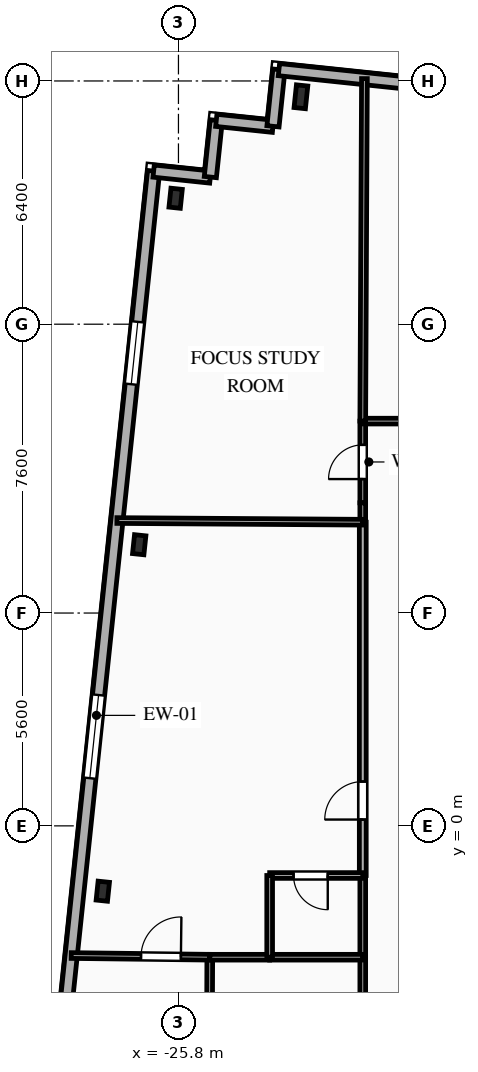
"""IFC4 building model, lengths in metres.
Left out: names, types, materials, properties, quantities, classifications, styles, units other than length and angle.
Written with IfcOpenShell. Run it as: python <this file> out.ifc"""

import sys

from ifc_helpers import new_model, si_unit, direction, frame, frame_2d, origin, origin_2d, place, context, subcontext, project, spatial, rectangle, i_section, extrude, element, fill, save


model = new_model("IFC4")
c1 = context("Model", 3, precision=1e-05, world=origin(), true_north=direction((0.0, 1.0)))
c2 = subcontext(c1, "Body", "Model", "MODEL_VIEW")
j1 = project(units=[si_unit("LENGTHUNIT", "METRE"), si_unit("PLANEANGLEUNIT", "RADIAN")], contexts=[c1])
p1 = place(None, origin())
s1 = spatial("IfcSite", under=j1, at=p1, CompositionType="ELEMENT")
p2 = place(p1, origin())
s2 = spatial("IfcBuilding", under=s1, at=p2, CompositionType="ELEMENT")
p3 = place(p2, frame((0.0, 0.0, 209.8)))
s3 = spatial("IfcBuildingStorey", under=s2, at=p3, CompositionType="ELEMENT", Elevation=209.8)
p4 = place(p3, frame((-22.577, 19.184, 0.0), z_axis=(0.0, 0.0, 1.0), x_axis=(0.994521895368, -0.104528463268, 0.0)))
e1 = element("IfcColumn", 1, at=p4, inside=s3, PredefinedType="COLUMN", context=c2, shape_type="SweptSolid", body=[
    extrude(i_section(OverallWidth=0.3, OverallDepth=0.6, WebThickness=0.015, FlangeThickness=0.03, FilletRadius=0.027, at=origin_2d()), origin(), (0.0, 0.0, 1.0), 3.35),
])
for number, where, z_axis, x_axis in (
    (2, (-25.875, 16.514, 0.0), (0.0, 0.0, 1.0), (0.995, -0.105, 0.0)),
    (3, (-26.833, 7.398, 0.0), (0.0, 0.0, 1.0), (0.995, -0.105, 0.0)),
    (4, (-27.791, -1.719, 0.0), (0.0, 0.0, 1.0), (0.995, -0.105, 0.0)),
):
    element("IfcColumn", number, at=place(p3, frame(where, z_axis=z_axis, x_axis=x_axis)), inside=s3, PredefinedType="COLUMN", context=c2, shape_type="SweptSolid", body=[
        extrude(i_section(OverallWidth=0.3, OverallDepth=0.5, WebThickness=0.014, FlangeThickness=0.028, FilletRadius=0.027, at=origin_2d()), origin(), (0.0, 0.0, 1.0), 3.35),
    ])
p5 = place(p3, frame((-29.463, -11.414, 0.0), z_axis=(0.0, 0.0, 1.0), x_axis=(0.104530779244, 0.994521651947, 0.0)))
e5 = element("IfcWall", 5, at=p5, inside=s3, PredefinedType="SOLIDWALL", context=c2, shape_type="SweptSolid", body=[
    extrude(rectangle(XDim=28.8, YDim=0.32, at=frame_2d((14.4, 0.0))), origin(), (0.0, 0.0, 1.0), 3.04),
])
p6 = place(p5, frame((3.467, 0.0, 0.85)))
e6 = element("IfcOpeningElement", 6, at=p6, cuts=e5, PredefinedType="OPENING", context=c2, shape_type="SweptSolid", body=[
    extrude(rectangle(XDim=1.65, YDim=1.85, at=frame_2d((0.825, 0.925))), frame((0.0, 0.17, 0.0), z_axis=(0.0, -1.0, 0.0), x_axis=(1.0, 0.0, 0.0)), (0.0, 0.0, 1.0), 0.34),
])
p7 = place(p5, frame((12.738, 0.0, 0.85)))
e7 = element("IfcOpeningElement", 7, at=p7, cuts=e5, PredefinedType="OPENING", context=c2, shape_type="SweptSolid", body=[
    extrude(rectangle(XDim=2.2, YDim=1.85, at=frame_2d((1.1, 0.925))), frame((0.0, 0.17, 0.0), z_axis=(0.0, -1.0, 0.0), x_axis=(1.0, 0.0, 0.0)), (0.0, 0.0, 1.0), 0.34),
])
p8 = place(p5, frame((23.162, 0.0, 0.85)))
e8 = element("IfcOpeningElement", 8, at=p8, cuts=e5, PredefinedType="OPENING", context=c2, shape_type="SweptSolid", body=[
    extrude(rectangle(XDim=1.65, YDim=1.85, at=frame_2d((0.825, 0.925))), frame((0.0, 0.17, 0.0), z_axis=(0.0, -1.0, 0.0), x_axis=(1.0, 0.0, 0.0)), (0.0, 0.0, 1.0), 0.34),
])
p9 = place(p3, frame((-26.453, 17.229, 0.0), z_axis=(0.0, 0.0, 1.0), x_axis=(0.994508128223, -0.104659366031, 0.0)))
e9 = element("IfcWall", 9, at=p9, inside=s3, PredefinedType="SOLIDWALL", context=c2, shape_type="SweptSolid", body=[
    extrude(rectangle(XDim=1.5, YDim=0.32, at=frame_2d((0.75, 0.0))), origin(), (0.0, 0.0, 1.0), 3.04),
])
p10 = place(p3, frame((-24.961, 17.072, 0.0), z_axis=(0.0, 0.0, 1.0), x_axis=(0.104642427191, 0.994509910675, 0.0)))
e10 = element("IfcWall", 10, at=p10, inside=s3, PredefinedType="SOLIDWALL", context=c2, shape_type="SweptSolid", body=[
    extrude(rectangle(XDim=1.5, YDim=0.32, at=frame_2d((0.75, 0.0))), origin(), (0.0, 0.0, 1.0), 3.04),
])
p11 = place(p3, frame((-24.804, 18.563, 0.0), z_axis=(0.0, 0.0, 1.0), x_axis=(0.994508128223, -0.104659366031, 0.0)))
e11 = element("IfcWall", 11, at=p11, inside=s3, PredefinedType="SOLIDWALL", context=c2, shape_type="SweptSolid", body=[
    extrude(rectangle(XDim=1.5, YDim=0.32, at=frame_2d((0.75, 0.0))), origin(), (0.0, 0.0, 1.0), 3.04),
])
p12 = place(p3, frame((-23.312, 18.406, 0.0), z_axis=(0.0, 0.0, 1.0), x_axis=(0.104481464157, 0.994526834051, 0.0)))
e12 = element("IfcWall", 12, at=p12, inside=s3, PredefinedType="SOLIDWALL", context=c2, shape_type="SweptSolid", body=[
    extrude(rectangle(XDim=1.5, YDim=0.32, at=frame_2d((0.75, 0.0))), origin(), (0.0, 0.0, 1.0), 3.04),
])
p13 = place(p3, frame((-23.156, 19.898, 0.0), z_axis=(0.0, 0.0, 1.0), x_axis=(0.994522001802, -0.104527450613, 0.0)))
e13 = element("IfcWall", 13, at=p13, inside=s3, PredefinedType="SOLIDWALL", context=c2, shape_type="SweptSolid", body=[
    extrude(rectangle(XDim=45.8, YDim=0.32, at=frame_2d((22.9, 0.0))), origin(), (0.0, 0.0, 1.0), 3.04),
])
p14 = place(p13, frame((6.021, 0.0, 0.85)))
e14 = element("IfcOpeningElement", 14, at=p14, cuts=e13, PredefinedType="OPENING", context=c2, shape_type="SweptSolid", body=[
    extrude(rectangle(XDim=1.65, YDim=1.85, at=frame_2d((0.825, 0.925))), frame((0.0, 0.17, 0.0), z_axis=(0.0, -1.0, 0.0), x_axis=(1.0, 0.0, 0.0)), (0.0, 0.0, 1.0), 0.34),
])
p15 = place(p13, frame((15.935, 0.0, 0.85)))
e15 = element("IfcOpeningElement", 15, at=p15, cuts=e13, PredefinedType="OPENING", context=c2, shape_type="SweptSolid", body=[
    extrude(rectangle(XDim=1.6, YDim=1.85, at=frame_2d((0.8, 0.925))), frame((0.0, 0.17, 0.0), z_axis=(0.0, -1.0, 0.0), x_axis=(1.0, 0.0, 0.0)), (0.0, 0.0, 1.0), 0.34),
])
p16 = place(p13, frame((22.881, 0.0, 0.85)))
e16 = element("IfcOpeningElement", 16, at=p16, cuts=e13, PredefinedType="OPENING", context=c2, shape_type="SweptSolid", body=[
    extrude(rectangle(XDim=2.2, YDim=1.85, at=frame_2d((1.1, 0.925))), frame((0.0, 0.17, 0.0), z_axis=(0.0, -1.0, 0.0), x_axis=(1.0, 0.0, 0.0)), (0.0, 0.0, 1.0), 0.34),
])
p17 = place(p13, frame((31.288, 0.0, 0.85)))
e17 = element("IfcOpeningElement", 17, at=p17, cuts=e13, PredefinedType="OPENING", context=c2, shape_type="SweptSolid", body=[
    extrude(rectangle(XDim=2.2, YDim=1.85, at=frame_2d((1.1, 0.925))), frame((0.0, 0.17, 0.0), z_axis=(0.0, -1.0, 0.0), x_axis=(1.0, 0.0, 0.0)), (0.0, 0.0, 1.0), 0.34),
])
p18 = place(p13, frame((39.69, 0.0, 0.85)))
e18 = element("IfcOpeningElement", 18, at=p18, cuts=e13, PredefinedType="OPENING", context=c2, shape_type="SweptSolid", body=[
    extrude(rectangle(XDim=1.65, YDim=1.85, at=frame_2d((0.825, 0.925))), frame((0.0, 0.17, 0.0), z_axis=(0.0, -1.0, 0.0), x_axis=(1.0, 0.0, 0.0)), (0.0, 0.0, 1.0), 0.34),
])
p19 = place(p3, frame((-20.95, 8.5, 0.0), z_axis=(0.0, 0.0, 1.0), x_axis=(0.0, 1.0, 0.0)))
e19 = element("IfcWall", 19, at=p19, inside=s3, PredefinedType="PARTITIONING", context=c2, shape_type="SweptSolid", body=[
    extrude(rectangle(XDim=2.15, YDim=0.15, at=frame_2d((1.075, 0.0))), origin(), (0.0, 0.0, 1.0), 3.04),
])
p20 = place(p19, frame((0.625, 0.0, 0.0)))
e20 = element("IfcOpeningElement", 20, at=p20, cuts=e19, PredefinedType="OPENING", context=c2, shape_type="SweptSolid", body=[
    extrude(rectangle(XDim=0.9, YDim=2.1, at=frame_2d((0.45, 1.05))), frame((0.0, 0.085, 0.0), z_axis=(0.0, -1.0, 0.0), x_axis=(1.0, 0.0, 0.0)), (0.0, 0.0, 1.0), 0.17),
])
p21 = place(p3, frame((-20.95, 10.65, 0.0), z_axis=(0.0, 0.0, 1.0), x_axis=(1.0, 0.0, 0.0)))
e21 = element("IfcWall", 21, at=p21, inside=s3, PredefinedType="PARTITIONING", context=c2, shape_type="SweptSolid", body=[
    extrude(rectangle(XDim=8.98, YDim=0.15, at=frame_2d((4.49, 0.0))), origin(), (0.0, 0.0, 1.0), 3.04),
])
p22 = place(p21, frame((6.504, 0.0, 0.0)))
e22 = element("IfcOpeningElement", 22, at=p22, cuts=e21, PredefinedType="OPENING", context=c2, shape_type="SweptSolid", body=[
    extrude(rectangle(XDim=1.05, YDim=2.15, at=frame_2d((0.525, 1.075))), frame((0.0, 0.085, 0.0), z_axis=(0.0, -1.0, 0.0), x_axis=(1.0, 0.0, 0.0)), (0.0, 0.0, 1.0), 0.17),
])
p23 = place(p3, frame((-20.95, -5.6, 0.0), z_axis=(0.0, 0.0, 1.0), x_axis=(0.0, 1.0, 0.0)))
e23 = element("IfcWall", 23, at=p23, inside=s3, PredefinedType="PARTITIONING", context=c2, shape_type="SweptSolid", body=[
    extrude(rectangle(XDim=2.144, YDim=0.15, at=frame_2d((1.072, 0.0))), origin(), (0.0, 0.0, 1.0), 3.04),
])
p24 = place(p3, frame((-20.95, -1.306, 0.0), z_axis=(0.0, 0.0, 1.0), x_axis=(0.0, 1.0, 0.0)))
e24 = element("IfcWall", 24, at=p24, inside=s3, PredefinedType="PARTITIONING", context=c2, shape_type="SweptSolid", body=[
    extrude(rectangle(XDim=9.296, YDim=0.18, at=frame_2d((4.648, 0.0))), origin(), (0.0, 0.0, 1.0), 3.04),
])
p25 = place(p24, frame((1.472, 0.0, 0.0)))
e25 = element("IfcOpeningElement", 25, at=p25, cuts=e24, PredefinedType="OPENING", context=c2, shape_type="SweptSolid", body=[
    extrude(rectangle(XDim=1.0, YDim=2.15, at=frame_2d((0.5, 1.075))), frame((0.0, 0.1, 0.0), z_axis=(0.0, -1.0, 0.0), x_axis=(1.0, 0.0, 0.0)), (0.0, 0.0, 1.0), 0.2),
])
p26 = place(p3, frame((-20.95, -3.456, 0.0), z_axis=(0.0, 0.0, 1.0), x_axis=(0.0, 1.0, 0.0)))
e26 = element("IfcWall", 26, at=p26, inside=s3, PredefinedType="PLUMBINGWALL", context=c2, shape_type="SweptSolid", body=[
    extrude(rectangle(XDim=2.15, YDim=0.15, at=frame_2d((1.075, 0.0))), origin(), (0.0, 0.0, 1.0), 3.04),
])
p27 = place(p3, frame((-20.95, 7.99, 0.0), z_axis=(0.0, 0.0, 1.0), x_axis=(0.0, 1.0, 0.0)))
e27 = element("IfcWall", 27, at=p27, inside=s3, PredefinedType="PARTITIONING", context=c2, shape_type="SweptSolid", body=[
    extrude(rectangle(XDim=0.51, YDim=0.15, at=frame_2d((0.255, 0.0))), origin(), (0.0, 0.0, 1.0), 3.04),
])
p28 = place(p3, frame((-24.976, -3.456, 0.0), z_axis=(0.0, 0.0, 1.0), x_axis=(-0.003840873, -0.99999262382, 0.0)))
e28 = element("IfcWall", 28, at=p28, inside=s3, PredefinedType="PARTITIONING", context=c2, shape_type="SweptSolid", body=[
    extrude(rectangle(XDim=11.441, YDim=0.15, at=frame_2d((5.721, 0.0))), origin(), (0.0, 0.0, 1.0), 3.04),
])
p29 = place(p3, frame((-28.622, -3.412, 0.0), z_axis=(0.0, 0.0, 1.0), x_axis=(0.999927389555, -0.01205054433, 0.0)))
e29 = element("IfcWall", 29, at=p29, inside=s3, PredefinedType="PARTITIONING", context=c2, shape_type="SweptSolid", body=[
    extrude(rectangle(XDim=3.647, YDim=0.15, at=frame_2d((1.823, 0.0))), origin(), (0.0, 0.0, 1.0), 3.04),
])
p30 = place(p29, frame((1.837, 0.0, 0.0)))
e30 = element("IfcOpeningElement", 30, at=p30, cuts=e29, PredefinedType="OPENING", context=c2, shape_type="SweptSolid", body=[
    extrude(rectangle(XDim=1.05, YDim=2.15, at=frame_2d((0.525, 1.075))), frame((0.0, 0.085, 0.0), z_axis=(0.0, -1.0, 0.0), x_axis=(1.0, 0.0, 0.0)), (0.0, 0.0, 1.0), 0.17),
])
p31 = place(p3, frame((-24.976, -3.456, 0.0), z_axis=(0.0, 0.0, 1.0), x_axis=(1.0, 0.0, 0.0)))
e31 = element("IfcWall", 31, at=p31, inside=s3, PredefinedType="PARTITIONING", context=c2, shape_type="SweptSolid", body=[
    extrude(rectangle(XDim=1.576, YDim=0.15, at=frame_2d((0.788, 0.0))), origin(), (0.0, 0.0, 1.0), 3.04),
])
p32 = place(p3, frame((-23.4, -3.456, 0.0), z_axis=(0.0, 0.0, 1.0), x_axis=(1.0, 0.0, 0.0)))
e32 = element("IfcWall", 32, at=p32, inside=s3, PredefinedType="PLUMBINGWALL", context=c2, shape_type="SweptSolid", body=[
    extrude(rectangle(XDim=2.45, YDim=0.15, at=frame_2d((1.225, 0.0))), origin(), (0.0, 0.0, 1.0), 3.04),
])
p33 = place(p3, frame((-20.95, -1.306, 0.0), z_axis=(0.0, 0.0, 1.0), x_axis=(-1.0, 0.0, 0.0)))
e33 = element("IfcWall", 33, at=p33, inside=s3, PredefinedType="PLUMBINGWALL", context=c2, shape_type="SweptSolid", body=[
    extrude(rectangle(XDim=2.45, YDim=0.15, at=frame_2d((1.225, 0.0))), origin(), (0.0, 0.0, 1.0), 3.04),
])
p34 = place(p33, frame((0.921, 0.0, 0.0)))
e34 = element("IfcOpeningElement", 34, at=p34, cuts=e33, PredefinedType="OPENING", context=c2, shape_type="SweptSolid", body=[
    extrude(rectangle(XDim=0.9, YDim=2.1, at=frame_2d((0.45, 1.05))), frame((0.0, 0.085, 0.0), z_axis=(0.0, -1.0, 0.0), x_axis=(1.0, 0.0, 0.0)), (0.0, 0.0, 1.0), 0.17),
])
p35 = place(p3, frame((-23.4, -1.306, 0.0), z_axis=(0.0, 0.0, 1.0), x_axis=(0.0, -1.0, 0.0)))
e35 = element("IfcWall", 35, at=p35, inside=s3, PredefinedType="PLUMBINGWALL", context=c2, shape_type="SweptSolid", body=[
    extrude(rectangle(XDim=2.15, YDim=0.15, at=frame_2d((1.075, 0.0))), origin(), (0.0, 0.0, 1.0), 2.695),
])
p36 = place(p3, frame((-27.419, 8.034, 0.0), z_axis=(0.0, 0.0, 1.0), x_axis=(0.999976928608, -0.006792808784, 0.0)))
e36 = element("IfcWall", 36, at=p36, inside=s3, PredefinedType="PARTITIONING", context=c2, shape_type="SweptSolid", body=[
    extrude(rectangle(XDim=6.469, YDim=0.15, at=frame_2d((3.235, 0.0))), origin(), (0.0, 0.0, 1.0), 3.04),
])
p37 = place(p3, frame((-20.906, 19.662, 0.0), z_axis=(0.0, 0.0, 1.0), x_axis=(-0.004876272857, -0.999988110911, 0.0)))
e37 = element("IfcWall", 37, at=p37, inside=s3, PredefinedType="PARTITIONING", context=c2, shape_type="SweptSolid", body=[
    extrude(rectangle(XDim=9.012, YDim=0.15, at=frame_2d((4.506, 0.0))), origin(), (0.0, 0.0, 1.0), 2.665),
])
p38 = place(p7, origin())
e38 = element("IfcWindow", 38, at=p38, inside=s3, PartitioningType="SINGLE_PANEL", PredefinedType="WINDOW", context=c2, shape_type="SweptSolid", body=[
    extrude(rectangle(XDim=2.2, YDim=1.85, at=frame_2d((1.1, 0.925))), frame((0.0, 0.03, 0.0), z_axis=(0.0, -1.0, 0.0), x_axis=(1.0, 0.0, 0.0)), (0.0, 0.0, 1.0), 0.06),
])
fill(e7, e38)
p39 = place(p8, origin())
e39 = element("IfcWindow", 39, at=p39, inside=s3, PartitioningType="SINGLE_PANEL", PredefinedType="WINDOW", context=c2, shape_type="SweptSolid", body=[
    extrude(rectangle(XDim=1.65, YDim=1.85, at=frame_2d((0.825, 0.925))), frame((0.0, 0.03, 0.0), z_axis=(0.0, -1.0, 0.0), x_axis=(1.0, 0.0, 0.0)), (0.0, 0.0, 1.0), 0.06),
])
fill(e8, e39)
p40 = place(p20, origin())
e40 = element("IfcDoor", 40, at=p40, inside=s3, OperationType="SINGLE_SWING_LEFT", PredefinedType="DOOR", context=c2, shape_type="SweptSolid", body=[
    extrude(rectangle(XDim=0.9, YDim=2.1, at=frame_2d((0.45, 1.05))), frame((0.0, 0.025, 0.0), z_axis=(0.0, -1.0, 0.0), x_axis=(1.0, 0.0, 0.0)), (0.0, 0.0, 1.0), 0.05),
])
fill(e20, e40)
p41 = place(p25, origin())
e41 = element("IfcDoor", 41, at=p41, inside=s3, OperationType="SINGLE_SWING_LEFT", PredefinedType="DOOR", context=c2, shape_type="SweptSolid", body=[
    extrude(rectangle(XDim=1.0, YDim=2.15, at=frame_2d((0.5, 1.075))), frame((0.0, 0.025, 0.0), z_axis=(0.0, -1.0, 0.0), x_axis=(1.0, 0.0, 0.0)), (0.0, 0.0, 1.0), 0.05),
])
fill(e25, e41)
p42 = place(p30, origin())
e42 = element("IfcDoor", 42, at=p42, inside=s3, OperationType="SINGLE_SWING_RIGHT", PredefinedType="DOOR", context=c2, shape_type="SweptSolid", body=[
    extrude(rectangle(XDim=1.05, YDim=2.15, at=frame_2d((0.525, 1.075))), frame((0.0, 0.025, 0.0), z_axis=(0.0, -1.0, 0.0), x_axis=(1.0, 0.0, 0.0)), (0.0, 0.0, 1.0), 0.05),
])
fill(e30, e42)
p43 = place(p34, origin())
e43 = element("IfcDoor", 43, at=p43, inside=s3, OperationType="SINGLE_SWING_LEFT", PredefinedType="DOOR", context=c2, shape_type="SweptSolid", body=[
    extrude(rectangle(XDim=0.9, YDim=2.1, at=frame_2d((0.45, 1.05))), frame((0.0, 0.025, 0.0), z_axis=(0.0, -1.0, 0.0), x_axis=(1.0, 0.0, 0.0)), (0.0, 0.0, 1.0), 0.05),
])
fill(e34, e43)
save(model, sys.argv[1])
